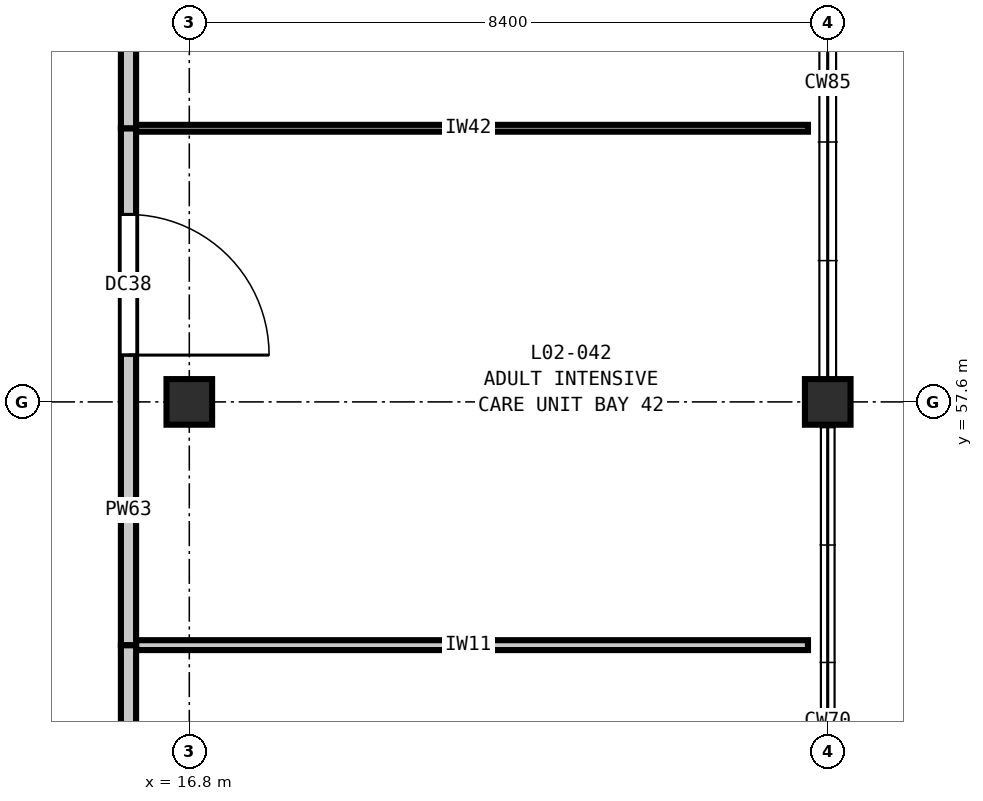
"""IFC4 building model, lengths in metres.
Left out: names, types, materials, properties, quantities, classifications, styles, units other than length and angle.
Written with IfcOpenShell. Run it as: python <this file> out.ifc"""

import sys

from ifc_helpers import new_model, si_unit, direction, frame, frame_2d, origin, origin_2d, place, context, subcontext, project, spatial, rectangle, extrude, element, fill, save


model = new_model("IFC4")
c1 = context("Model", 3, precision=1e-05, world=origin(), true_north=direction((0.0, 1.0)))
c2 = subcontext(c1, "Body", "Model", "MODEL_VIEW")
j1 = project(units=[si_unit("LENGTHUNIT", "METRE"), si_unit("PLANEANGLEUNIT", "RADIAN")], contexts=[c1])
p1 = place(None, origin())
s1 = spatial("IfcSite", under=j1, at=p1, CompositionType="ELEMENT")
p2 = place(p1, origin())
s2 = spatial("IfcBuilding", under=s1, at=p2, CompositionType="ELEMENT")
p3 = place(p2, frame((0.0, 0.0, 10.8)))
s3 = spatial("IfcBuildingStorey", under=s2, at=p3, CompositionType="ELEMENT", Elevation=10.8)
for number, where, z_axis, x_axis in (
    (1, (16.8, 57.6, 0.0), (0.0, 0.0, 1.0), (1.0, 0.0, 0.0)),
    (2, (25.2, 57.6, 0.0), (0.0, 0.0, 1.0), (1.0, 0.0, 0.0)),
):
    element("IfcColumn", number, at=place(p3, frame(where, z_axis=z_axis, x_axis=x_axis)), inside=s3, PredefinedType="COLUMN", context=c2, shape_type="SweptSolid", body=[
        extrude(rectangle(XDim=0.6, YDim=0.6, at=origin_2d()), origin(), (0.0, 0.0, 1.0), 5.4),
    ])
p4 = place(p3, frame((16.0, 54.4, 0.0), z_axis=(0.0, 0.0, 1.0), x_axis=(1.0, 0.0, 0.0)))
e3 = element("IfcWall", 3, at=p4, inside=s3, PredefinedType="PARTITIONING", context=c2, shape_type="SweptSolid", body=[
    extrude(rectangle(XDim=8.94, YDim=0.13, at=frame_2d((4.47, 0.0))), origin(), (0.0, 0.0, 1.0), 5.07),
])
p5 = place(p3, frame((16.0, 61.2, 0.0), z_axis=(0.0, 0.0, 1.0), x_axis=(1.0, 0.0, 0.0)))
e4 = element("IfcWall", 4, at=p5, inside=s3, PredefinedType="PARTITIONING", context=c2, shape_type="SweptSolid", body=[
    extrude(rectangle(XDim=8.94, YDim=0.09, at=frame_2d((4.47, 0.0))), origin(), (0.0, 0.0, 1.0), 5.07),
])
p6 = place(p3, frame((16.0, 47.6, 0.0), z_axis=(0.0, 0.0, 1.0), x_axis=(0.0, 1.0, 0.0)))
e5 = element("IfcWall", 5, at=p6, inside=s3, PredefinedType="PARTITIONING", context=c2, shape_type="SweptSolid", body=[
    extrude(rectangle(XDim=6.8, YDim=0.2, at=frame_2d((3.4, 0.0))), origin(), (0.0, 0.0, 1.0), 5.07),
])
p7 = place(p6, frame((2.55, 0.0, 0.0)))
e6 = element("IfcOpeningElement", 6, at=p7, cuts=e5, PredefinedType="OPENING", context=c2, shape_type="SweptSolid", body=[
    extrude(rectangle(XDim=1.7, YDim=2.3, at=frame_2d((0.85, 1.15))), frame((0.0, 0.11, 0.0), z_axis=(0.0, -1.0, 0.0), x_axis=(1.0, 0.0, 0.0)), (0.0, 0.0, 1.0), 0.22),
])
p8 = place(p3, frame((16.0, 54.4, 0.0), z_axis=(0.0, 0.0, 1.0), x_axis=(0.0, 1.0, 0.0)))
e7 = element("IfcWall", 7, at=p8, inside=s3, PredefinedType="PARTITIONING", context=c2, shape_type="SweptSolid", body=[
    extrude(rectangle(XDim=6.8, YDim=0.2, at=frame_2d((3.4, 0.0))), origin(), (0.0, 0.0, 1.0), 5.07),
])
p9 = place(p8, frame((3.816, 0.0, 0.0)))
e8 = element("IfcOpeningElement", 8, at=p9, cuts=e7, PredefinedType="OPENING", context=c2, shape_type="SweptSolid", body=[
    extrude(rectangle(XDim=1.85, YDim=2.3, at=frame_2d((0.925, 1.15))), frame((0.0, 0.11, 0.0), z_axis=(0.0, -1.0, 0.0), x_axis=(1.0, 0.0, 0.0)), (0.0, 0.0, 1.0), 0.22),
])
p10 = place(p3, frame((16.0, 61.2, 0.0), z_axis=(0.0, 0.0, 1.0), x_axis=(0.0, 1.0, 0.0)))
e9 = element("IfcWall", 9, at=p10, inside=s3, PredefinedType="PARTITIONING", context=c2, shape_type="SweptSolid", body=[
    extrude(rectangle(XDim=6.8, YDim=0.2, at=frame_2d((3.4, 0.0))), origin(), (0.0, 0.0, 1.0), 5.07),
])
p11 = place(p10, frame((2.775, 0.0, 0.0)))
e10 = element("IfcOpeningElement", 10, at=p11, cuts=e9, PredefinedType="OPENING", context=c2, shape_type="SweptSolid", body=[
    extrude(rectangle(XDim=1.25, YDim=2.15, at=frame_2d((0.625, 1.075))), frame((0.0, 0.11, 0.0), z_axis=(0.0, -1.0, 0.0), x_axis=(1.0, 0.0, 0.0)), (0.0, 0.0, 1.0), 0.22),
])
p12 = place(p9, frame((1.85, 0.0, 0.0), z_axis=(0.0, 0.0, 1.0), x_axis=(-1.0, 0.0, 0.0)))
e11 = element("IfcDoor", 11, at=p12, inside=s3, OperationType="SINGLE_SWING_RIGHT", PredefinedType="DOOR", context=c2, shape_type="SweptSolid", body=[
    extrude(rectangle(XDim=1.85, YDim=2.3, at=frame_2d((0.925, 1.15))), frame((0.0, 0.025, 0.0), z_axis=(0.0, -1.0, 0.0), x_axis=(1.0, 0.0, 0.0)), (0.0, 0.0, 1.0), 0.05),
])
fill(e8, e11)
save(model, sys.argv[1])
